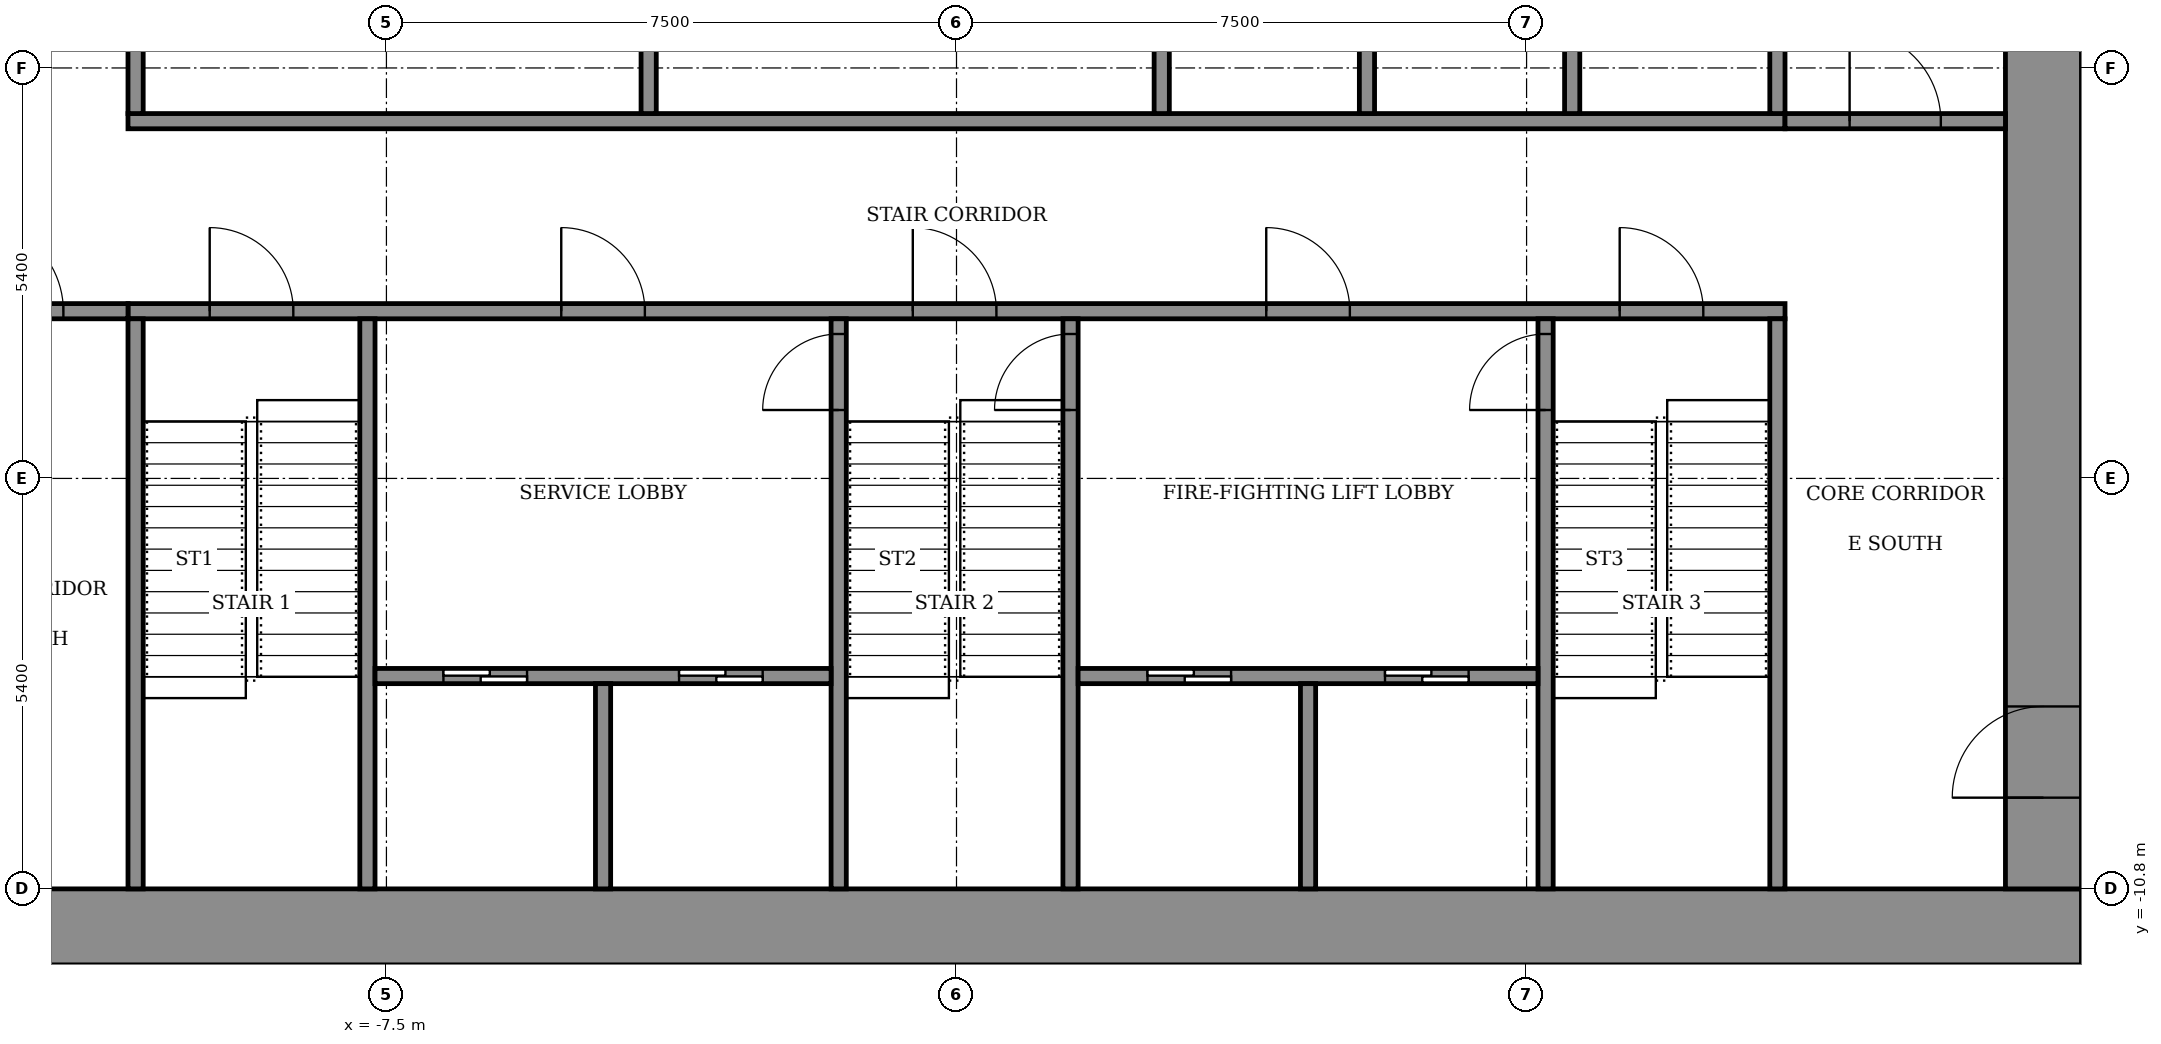
"""IFC4 building model, lengths in metres.
Left out: names, types, materials, properties, quantities, classifications, styles, units other than length and angle.
Written with IfcOpenShell. Run it as: python <this file> out.ifc"""

import sys

from ifc_helpers import new_model, si_unit, direction, frame, frame_2d, origin, place, context, subcontext, project, spatial, rectangle, extrude, element, fill, save


model = new_model("IFC4")
c1 = context("Model", 3, precision=1e-05, world=origin(), true_north=direction((0.0, 1.0)))
c2 = subcontext(c1, "Body", "Model", "MODEL_VIEW")
j1 = project(units=[si_unit("LENGTHUNIT", "METRE"), si_unit("PLANEANGLEUNIT", "RADIAN")], contexts=[c1])
p1 = place(None, origin())
s1 = spatial("IfcSite", under=j1, at=p1, CompositionType="ELEMENT")
p2 = place(p1, origin())
s2 = spatial("IfcBuilding", under=s1, at=p2, CompositionType="ELEMENT")
p3 = place(p2, frame((0.0, 0.0, 125.5)))
s3 = spatial("IfcBuildingStorey", under=s2, at=p3, CompositionType="ELEMENT", Elevation=125.5)
p4 = place(p3, frame((-14.8, -11.3, 0.0), z_axis=(0.0, 0.0, 1.0), x_axis=(1.0, 0.0, 0.0)))
e1 = element("IfcWall", 1, at=p4, inside=s3, PredefinedType="SHEAR", context=c2, shape_type="SweptSolid", body=[
    extrude(rectangle(XDim=29.6, YDim=1.0, at=frame_2d((14.8, 0.0))), origin(), (0.0, 0.0, 1.0), 4.6),
])
p5 = place(p3, frame((14.3, -10.8, 0.0), z_axis=(0.0, 0.0, 1.0), x_axis=(0.0, 1.0, 0.0)))
e2 = element("IfcWall", 2, at=p5, inside=s3, PredefinedType="SHEAR", context=c2, shape_type="SweptSolid", body=[
    extrude(rectangle(XDim=21.6, YDim=1.0, at=frame_2d((10.8, 0.0))), origin(), (0.0, 0.0, 1.0), 4.6),
])
p6 = place(p5, frame((1.2, 0.0, 0.0)))
e3 = element("IfcOpeningElement", 3, at=p6, cuts=e2, PredefinedType="OPENING", context=c2, shape_type="SweptSolid", body=[
    extrude(rectangle(XDim=1.2, YDim=2.1, at=frame_2d((0.6, 1.05))), frame((0.0, 0.51, 0.0), z_axis=(0.0, -1.0, 0.0), x_axis=(1.0, 0.0, 0.0)), (0.0, 0.0, 1.0), 1.02),
])
p7 = place(p3, frame((-10.9, -3.2, 0.0), z_axis=(0.0, 0.0, 1.0), x_axis=(1.0, 0.0, 0.0)))
e4 = element("IfcWall", 4, at=p7, inside=s3, PredefinedType="SHEAR", context=c2, shape_type="SweptSolid", body=[
    extrude(rectangle(XDim=21.8, YDim=0.2, at=frame_2d((10.9, 0.0))), origin(), (0.0, 0.0, 1.0), 4.05),
])
p8 = place(p7, frame((1.075, 0.0, 0.0)))
e5 = element("IfcOpeningElement", 5, at=p8, cuts=e4, PredefinedType="OPENING", context=c2, shape_type="SweptSolid", body=[
    extrude(rectangle(XDim=1.1, YDim=2.1, at=frame_2d((0.55, 1.05))), frame((0.0, 0.11, 0.0), z_axis=(0.0, -1.0, 0.0), x_axis=(1.0, 0.0, 0.0)), (0.0, 0.0, 1.0), 0.22),
])
p9 = place(p7, frame((10.325, 0.0, 0.0)))
e6 = element("IfcOpeningElement", 6, at=p9, cuts=e4, PredefinedType="OPENING", context=c2, shape_type="SweptSolid", body=[
    extrude(rectangle(XDim=1.1, YDim=2.1, at=frame_2d((0.55, 1.05))), frame((0.0, 0.11, 0.0), z_axis=(0.0, -1.0, 0.0), x_axis=(1.0, 0.0, 0.0)), (0.0, 0.0, 1.0), 0.22),
])
p10 = place(p7, frame((19.625, 0.0, 0.0)))
e7 = element("IfcOpeningElement", 7, at=p10, cuts=e4, PredefinedType="OPENING", context=c2, shape_type="SweptSolid", body=[
    extrude(rectangle(XDim=1.1, YDim=2.1, at=frame_2d((0.55, 1.05))), frame((0.0, 0.11, 0.0), z_axis=(0.0, -1.0, 0.0), x_axis=(1.0, 0.0, 0.0)), (0.0, 0.0, 1.0), 0.22),
])
p11 = place(p7, frame((5.7, 0.0, 0.0)))
e8 = element("IfcOpeningElement", 8, at=p11, cuts=e4, PredefinedType="OPENING", context=c2, shape_type="SweptSolid", body=[
    extrude(rectangle(XDim=1.1, YDim=2.1, at=frame_2d((0.55, 1.05))), frame((0.0, 0.11, 0.0), z_axis=(0.0, -1.0, 0.0), x_axis=(1.0, 0.0, 0.0)), (0.0, 0.0, 1.0), 0.22),
])
p12 = place(p7, frame((14.975, 0.0, 0.0)))
e9 = element("IfcOpeningElement", 9, at=p12, cuts=e4, PredefinedType="OPENING", context=c2, shape_type="SweptSolid", body=[
    extrude(rectangle(XDim=1.1, YDim=2.1, at=frame_2d((0.55, 1.05))), frame((0.0, 0.11, 0.0), z_axis=(0.0, -1.0, 0.0), x_axis=(1.0, 0.0, 0.0)), (0.0, 0.0, 1.0), 0.22),
])
p13 = place(p3, frame((-10.9, -0.7, 0.0), z_axis=(0.0, 0.0, 1.0), x_axis=(1.0, 0.0, 0.0)))
e10 = element("IfcWall", 10, at=p13, inside=s3, PredefinedType="SHEAR", context=c2, shape_type="SweptSolid", body=[
    extrude(rectangle(XDim=21.8, YDim=0.2, at=frame_2d((10.9, 0.0))), origin(), (0.0, 0.0, 1.0), 4.05),
])
for number, where, z_axis, x_axis in (
    (11, (-10.8, -10.8, 0.0), (0.0, 0.0, 1.0), (0.0, 1.0, 0.0)),
    (12, (-7.75, -10.8, 0.0), (0.0, 0.0, 1.0), (0.0, 1.0, 0.0)),
):
    element("IfcWall", number, at=place(p3, frame(where, z_axis=z_axis, x_axis=x_axis)), inside=s3, PredefinedType="SHEAR", context=c2, shape_type="SweptSolid", body=[
        extrude(rectangle(XDim=7.5, YDim=0.2, at=frame_2d((3.75, 0.0))), origin(), (0.0, 0.0, 1.0), 4.05),
    ])
p14 = place(p3, frame((-1.55, -10.8, 0.0), z_axis=(0.0, 0.0, 1.0), x_axis=(0.0, 1.0, 0.0)))
e13 = element("IfcWall", 13, at=p14, inside=s3, PredefinedType="SHEAR", context=c2, shape_type="SweptSolid", body=[
    extrude(rectangle(XDim=7.5, YDim=0.2, at=frame_2d((3.75, 0.0))), origin(), (0.0, 0.0, 1.0), 4.05),
])
p15 = place(p14, frame((6.3, 0.0, 0.0)))
e14 = element("IfcOpeningElement", 14, at=p15, cuts=e13, PredefinedType="OPENING", context=c2, shape_type="SweptSolid", body=[
    extrude(rectangle(XDim=1.0, YDim=2.1, at=frame_2d((0.5, 1.05))), frame((0.0, 0.11, 0.0), z_axis=(0.0, -1.0, 0.0), x_axis=(1.0, 0.0, 0.0)), (0.0, 0.0, 1.0), 0.22),
])
p16 = place(p3, frame((1.5, -10.8, 0.0), z_axis=(0.0, 0.0, 1.0), x_axis=(0.0, 1.0, 0.0)))
e15 = element("IfcWall", 15, at=p16, inside=s3, PredefinedType="SHEAR", context=c2, shape_type="SweptSolid", body=[
    extrude(rectangle(XDim=7.5, YDim=0.2, at=frame_2d((3.75, 0.0))), origin(), (0.0, 0.0, 1.0), 4.05),
])
p17 = place(p16, frame((6.3, 0.0, 0.0)))
e16 = element("IfcOpeningElement", 16, at=p17, cuts=e15, PredefinedType="OPENING", context=c2, shape_type="SweptSolid", body=[
    extrude(rectangle(XDim=1.0, YDim=2.1, at=frame_2d((0.5, 1.05))), frame((0.0, 0.11, 0.0), z_axis=(0.0, -1.0, 0.0), x_axis=(1.0, 0.0, 0.0)), (0.0, 0.0, 1.0), 0.22),
])
p18 = place(p3, frame((7.75, -10.8, 0.0), z_axis=(0.0, 0.0, 1.0), x_axis=(0.0, 1.0, 0.0)))
e17 = element("IfcWall", 17, at=p18, inside=s3, PredefinedType="SHEAR", context=c2, shape_type="SweptSolid", body=[
    extrude(rectangle(XDim=7.5, YDim=0.2, at=frame_2d((3.75, 0.0))), origin(), (0.0, 0.0, 1.0), 4.05),
])
p19 = place(p18, frame((6.3, 0.0, 0.0)))
e18 = element("IfcOpeningElement", 18, at=p19, cuts=e17, PredefinedType="OPENING", context=c2, shape_type="SweptSolid", body=[
    extrude(rectangle(XDim=1.0, YDim=2.1, at=frame_2d((0.5, 1.05))), frame((0.0, 0.11, 0.0), z_axis=(0.0, -1.0, 0.0), x_axis=(1.0, 0.0, 0.0)), (0.0, 0.0, 1.0), 0.22),
])
p20 = place(p3, frame((10.8, -10.8, 0.0), z_axis=(0.0, 0.0, 1.0), x_axis=(0.0, 1.0, 0.0)))
e19 = element("IfcWall", 19, at=p20, inside=s3, PredefinedType="SHEAR", context=c2, shape_type="SweptSolid", body=[
    extrude(rectangle(XDim=7.5, YDim=0.2, at=frame_2d((3.75, 0.0))), origin(), (0.0, 0.0, 1.0), 4.05),
])
p21 = place(p3, frame((-7.65, -8.0, 0.0), z_axis=(0.0, 0.0, 1.0), x_axis=(1.0, 0.0, 0.0)))
e20 = element("IfcWall", 20, at=p21, inside=s3, PredefinedType="SHEAR", context=c2, shape_type="SweptSolid", body=[
    extrude(rectangle(XDim=6.0, YDim=0.2, at=frame_2d((3.0, 0.0))), origin(), (0.0, 0.0, 1.0), 4.05),
])
p22 = place(p21, frame((0.9, 0.0, 0.0)))
e21 = element("IfcOpeningElement", 21, at=p22, cuts=e20, PredefinedType="OPENING", context=c2, shape_type="SweptSolid", body=[
    extrude(rectangle(XDim=1.1, YDim=2.1, at=frame_2d((0.55, 1.05))), frame((0.0, 0.11, 0.0), z_axis=(0.0, -1.0, 0.0), x_axis=(1.0, 0.0, 0.0)), (0.0, 0.0, 1.0), 0.22),
])
p23 = place(p21, frame((4.0, 0.0, 0.0)))
e22 = element("IfcOpeningElement", 22, at=p23, cuts=e20, PredefinedType="OPENING", context=c2, shape_type="SweptSolid", body=[
    extrude(rectangle(XDim=1.1, YDim=2.1, at=frame_2d((0.55, 1.05))), frame((0.0, 0.11, 0.0), z_axis=(0.0, -1.0, 0.0), x_axis=(1.0, 0.0, 0.0)), (0.0, 0.0, 1.0), 0.22),
])
p24 = place(p3, frame((-4.65, -10.8, 0.0), z_axis=(0.0, 0.0, 1.0), x_axis=(0.0, 1.0, 0.0)))
e23 = element("IfcWall", 23, at=p24, inside=s3, PredefinedType="SHEAR", context=c2, shape_type="SweptSolid", body=[
    extrude(rectangle(XDim=2.7, YDim=0.2, at=frame_2d((1.35, 0.0))), origin(), (0.0, 0.0, 1.0), 4.05),
])
p25 = place(p3, frame((1.6, -8.0, 0.0), z_axis=(0.0, 0.0, 1.0), x_axis=(1.0, 0.0, 0.0)))
e24 = element("IfcWall", 24, at=p25, inside=s3, PredefinedType="SHEAR", context=c2, shape_type="SweptSolid", body=[
    extrude(rectangle(XDim=6.05, YDim=0.2, at=frame_2d((3.025, 0.0))), origin(), (0.0, 0.0, 1.0), 4.05),
])
p26 = place(p25, frame((0.913, 0.0, 0.0)))
e25 = element("IfcOpeningElement", 25, at=p26, cuts=e24, PredefinedType="OPENING", context=c2, shape_type="SweptSolid", body=[
    extrude(rectangle(XDim=1.1, YDim=2.1, at=frame_2d((0.55, 1.05))), frame((0.0, 0.11, 0.0), z_axis=(0.0, -1.0, 0.0), x_axis=(1.0, 0.0, 0.0)), (0.0, 0.0, 1.0), 0.22),
])
p27 = place(p25, frame((4.038, 0.0, 0.0)))
e26 = element("IfcOpeningElement", 26, at=p27, cuts=e24, PredefinedType="OPENING", context=c2, shape_type="SweptSolid", body=[
    extrude(rectangle(XDim=1.1, YDim=2.1, at=frame_2d((0.55, 1.05))), frame((0.0, 0.11, 0.0), z_axis=(0.0, -1.0, 0.0), x_axis=(1.0, 0.0, 0.0)), (0.0, 0.0, 1.0), 0.22),
])
p28 = place(p3, frame((4.625, -10.8, 0.0), z_axis=(0.0, 0.0, 1.0), x_axis=(0.0, 1.0, 0.0)))
e27 = element("IfcWall", 27, at=p28, inside=s3, PredefinedType="SHEAR", context=c2, shape_type="SweptSolid", body=[
    extrude(rectangle(XDim=2.7, YDim=0.2, at=frame_2d((1.35, 0.0))), origin(), (0.0, 0.0, 1.0), 4.05),
])
for number, where, z_axis, x_axis in (
    (28, (-10.8, -0.6, 0.0), (0.0, 0.0, 1.0), (0.0, 1.0, 0.0)),
    (29, (-4.05, -0.6, 0.0), (0.0, 0.0, 1.0), (0.0, 1.0, 0.0)),
):
    element("IfcWall", number, at=place(p3, frame(where, z_axis=z_axis, x_axis=x_axis)), inside=s3, PredefinedType="STANDARD", context=c2, shape_type="SweptSolid", body=[
        extrude(rectangle(XDim=2.5, YDim=0.2, at=frame_2d((1.25, 0.0))), origin(), (0.0, 0.0, 1.0), 4.05),
    ])
for number, where, z_axis, x_axis in (
    (30, (2.7, -0.6, 0.0), (0.0, 0.0, 1.0), (0.0, 1.0, 0.0)),
    (31, (5.4, -0.6, 0.0), (0.0, 0.0, 1.0), (0.0, 1.0, 0.0)),
    (32, (8.1, -0.6, 0.0), (0.0, 0.0, 1.0), (0.0, 1.0, 0.0)),
    (33, (10.8, -0.6, 0.0), (0.0, 0.0, 1.0), (0.0, 1.0, 0.0)),
):
    element("IfcWall", number, at=place(p3, frame(where, z_axis=z_axis, x_axis=x_axis)), inside=s3, PredefinedType="SHEAR", context=c2, shape_type="SweptSolid", body=[
        extrude(rectangle(XDim=2.5, YDim=0.2, at=frame_2d((1.25, 0.0))), origin(), (0.0, 0.0, 1.0), 4.05),
    ])
p29 = place(p3, frame((-13.8, -3.2, 0.0), z_axis=(0.0, 0.0, 1.0), x_axis=(1.0, 0.0, 0.0)))
e34 = element("IfcWall", 34, at=p29, inside=s3, PredefinedType="STANDARD", context=c2, shape_type="SweptSolid", body=[
    extrude(rectangle(XDim=2.9, YDim=0.2, at=frame_2d((1.45, 0.0))), origin(), (0.0, 0.0, 1.0), 4.05),
])
p30 = place(p29, frame((0.85, 0.0, 0.0)))
e35 = element("IfcOpeningElement", 35, at=p30, cuts=e34, PredefinedType="OPENING", context=c2, shape_type="SweptSolid", body=[
    extrude(rectangle(XDim=1.2, YDim=2.1, at=frame_2d((0.6, 1.05))), frame((0.0, 0.11, 0.0), z_axis=(0.0, -1.0, 0.0), x_axis=(1.0, 0.0, 0.0)), (0.0, 0.0, 1.0), 0.22),
])
p31 = place(p3, frame((10.9, -0.7, 0.0), z_axis=(0.0, 0.0, 1.0), x_axis=(1.0, 0.0, 0.0)))
e36 = element("IfcWall", 36, at=p31, inside=s3, PredefinedType="STANDARD", context=c2, shape_type="SweptSolid", body=[
    extrude(rectangle(XDim=2.9, YDim=0.2, at=frame_2d((1.45, 0.0))), origin(), (0.0, 0.0, 1.0), 4.05),
])
p32 = place(p31, frame((0.85, 0.0, 0.0)))
e37 = element("IfcOpeningElement", 37, at=p32, cuts=e36, PredefinedType="OPENING", context=c2, shape_type="SweptSolid", body=[
    extrude(rectangle(XDim=1.2, YDim=2.1, at=frame_2d((0.6, 1.05))), frame((0.0, 0.11, 0.0), z_axis=(0.0, -1.0, 0.0), x_axis=(1.0, 0.0, 0.0)), (0.0, 0.0, 1.0), 0.22),
])
p33 = place(p6, origin())
e38 = element("IfcDoor", 38, at=p33, inside=s3, OperationType="DOUBLE_DOOR_SINGLE_SWING", PredefinedType="DOOR", context=c2, shape_type="SweptSolid", body=[
    extrude(rectangle(XDim=1.2, YDim=2.1, at=frame_2d((0.6, 1.05))), frame((0.0, 0.025, 0.0), z_axis=(0.0, -1.0, 0.0), x_axis=(1.0, 0.0, 0.0)), (0.0, 0.0, 1.0), 0.05),
])
fill(e3, e38)
p34 = place(p26, origin())
e39 = element("IfcDoor", 39, at=p34, inside=s3, OperationType="SLIDING_TO_LEFT", PredefinedType="DOOR", context=c2, shape_type="SweptSolid", body=[
    extrude(rectangle(XDim=1.1, YDim=2.1, at=frame_2d((0.55, 1.05))), frame((0.0, 0.025, 0.0), z_axis=(0.0, -1.0, 0.0), x_axis=(1.0, 0.0, 0.0)), (0.0, 0.0, 1.0), 0.05),
])
fill(e25, e39)
p35 = place(p22, origin())
e40 = element("IfcDoor", 40, at=p35, inside=s3, OperationType="SLIDING_TO_LEFT", PredefinedType="DOOR", context=c2, shape_type="SweptSolid", body=[
    extrude(rectangle(XDim=1.1, YDim=2.1, at=frame_2d((0.55, 1.05))), frame((0.0, 0.025, 0.0), z_axis=(0.0, -1.0, 0.0), x_axis=(1.0, 0.0, 0.0)), (0.0, 0.0, 1.0), 0.05),
])
fill(e21, e40)
p36 = place(p27, origin())
e41 = element("IfcDoor", 41, at=p36, inside=s3, OperationType="SLIDING_TO_LEFT", PredefinedType="DOOR", context=c2, shape_type="SweptSolid", body=[
    extrude(rectangle(XDim=1.1, YDim=2.1, at=frame_2d((0.55, 1.05))), frame((0.0, 0.025, 0.0), z_axis=(0.0, -1.0, 0.0), x_axis=(1.0, 0.0, 0.0)), (0.0, 0.0, 1.0), 0.05),
])
fill(e26, e41)
p37 = place(p23, origin())
e42 = element("IfcDoor", 42, at=p37, inside=s3, OperationType="SLIDING_TO_LEFT", PredefinedType="DOOR", context=c2, shape_type="SweptSolid", body=[
    extrude(rectangle(XDim=1.1, YDim=2.1, at=frame_2d((0.55, 1.05))), frame((0.0, 0.025, 0.0), z_axis=(0.0, -1.0, 0.0), x_axis=(1.0, 0.0, 0.0)), (0.0, 0.0, 1.0), 0.05),
])
fill(e22, e42)
p38 = place(p8, origin())
e43 = element("IfcDoor", 43, at=p38, inside=s3, OperationType="SINGLE_SWING_RIGHT", PredefinedType="DOOR", context=c2, shape_type="SweptSolid", body=[
    extrude(rectangle(XDim=1.1, YDim=2.1, at=frame_2d((0.55, 1.05))), frame((0.0, 0.025, 0.0), z_axis=(0.0, -1.0, 0.0), x_axis=(1.0, 0.0, 0.0)), (0.0, 0.0, 1.0), 0.05),
])
fill(e5, e43)
p39 = place(p9, origin())
e44 = element("IfcDoor", 44, at=p39, inside=s3, OperationType="SINGLE_SWING_RIGHT", PredefinedType="DOOR", context=c2, shape_type="SweptSolid", body=[
    extrude(rectangle(XDim=1.1, YDim=2.1, at=frame_2d((0.55, 1.05))), frame((0.0, 0.025, 0.0), z_axis=(0.0, -1.0, 0.0), x_axis=(1.0, 0.0, 0.0)), (0.0, 0.0, 1.0), 0.05),
])
fill(e6, e44)
p40 = place(p10, origin())
e45 = element("IfcDoor", 45, at=p40, inside=s3, OperationType="SINGLE_SWING_RIGHT", PredefinedType="DOOR", context=c2, shape_type="SweptSolid", body=[
    extrude(rectangle(XDim=1.1, YDim=2.1, at=frame_2d((0.55, 1.05))), frame((0.0, 0.025, 0.0), z_axis=(0.0, -1.0, 0.0), x_axis=(1.0, 0.0, 0.0)), (0.0, 0.0, 1.0), 0.05),
])
fill(e7, e45)
p41 = place(p11, origin())
e46 = element("IfcDoor", 46, at=p41, inside=s3, OperationType="SINGLE_SWING_LEFT", PredefinedType="DOOR", context=c2, shape_type="SweptSolid", body=[
    extrude(rectangle(XDim=1.1, YDim=2.1, at=frame_2d((0.55, 1.05))), frame((0.0, 0.025, 0.0), z_axis=(0.0, -1.0, 0.0), x_axis=(1.0, 0.0, 0.0)), (0.0, 0.0, 1.0), 0.05),
])
fill(e8, e46)
p42 = place(p12, origin())
e47 = element("IfcDoor", 47, at=p42, inside=s3, OperationType="SINGLE_SWING_LEFT", PredefinedType="DOOR", context=c2, shape_type="SweptSolid", body=[
    extrude(rectangle(XDim=1.1, YDim=2.1, at=frame_2d((0.55, 1.05))), frame((0.0, 0.025, 0.0), z_axis=(0.0, -1.0, 0.0), x_axis=(1.0, 0.0, 0.0)), (0.0, 0.0, 1.0), 0.05),
])
fill(e9, e47)
p43 = place(p15, origin())
e48 = element("IfcDoor", 48, at=p43, inside=s3, OperationType="SINGLE_SWING_RIGHT", PredefinedType="DOOR", context=c2, shape_type="SweptSolid", body=[
    extrude(rectangle(XDim=1.0, YDim=2.1, at=frame_2d((0.5, 1.05))), frame((0.0, 0.025, 0.0), z_axis=(0.0, -1.0, 0.0), x_axis=(1.0, 0.0, 0.0)), (0.0, 0.0, 1.0), 0.05),
])
fill(e14, e48)
p44 = place(p17, origin())
e49 = element("IfcDoor", 49, at=p44, inside=s3, OperationType="SINGLE_SWING_RIGHT", PredefinedType="DOOR", context=c2, shape_type="SweptSolid", body=[
    extrude(rectangle(XDim=1.0, YDim=2.1, at=frame_2d((0.5, 1.05))), frame((0.0, 0.025, 0.0), z_axis=(0.0, -1.0, 0.0), x_axis=(1.0, 0.0, 0.0)), (0.0, 0.0, 1.0), 0.05),
])
fill(e16, e49)
p45 = place(p19, origin())
e50 = element("IfcDoor", 50, at=p45, inside=s3, OperationType="SINGLE_SWING_RIGHT", PredefinedType="DOOR", context=c2, shape_type="SweptSolid", body=[
    extrude(rectangle(XDim=1.0, YDim=2.1, at=frame_2d((0.5, 1.05))), frame((0.0, 0.025, 0.0), z_axis=(0.0, -1.0, 0.0), x_axis=(1.0, 0.0, 0.0)), (0.0, 0.0, 1.0), 0.05),
])
fill(e18, e50)
p46 = place(p30, origin())
e51 = element("IfcDoor", 51, at=p46, inside=s3, OperationType="SINGLE_SWING_LEFT", PredefinedType="DOOR", context=c2, shape_type="SweptSolid", body=[
    extrude(rectangle(XDim=1.2, YDim=2.1, at=frame_2d((0.6, 1.05))), frame((0.0, 0.025, 0.0), z_axis=(0.0, -1.0, 0.0), x_axis=(1.0, 0.0, 0.0)), (0.0, 0.0, 1.0), 0.05),
])
fill(e35, e51)
p47 = place(p32, origin())
e52 = element("IfcDoor", 52, at=p47, inside=s3, OperationType="SINGLE_SWING_LEFT", PredefinedType="DOOR", context=c2, shape_type="SweptSolid", body=[
    extrude(rectangle(XDim=1.2, YDim=2.1, at=frame_2d((0.6, 1.05))), frame((0.0, 0.025, 0.0), z_axis=(0.0, -1.0, 0.0), x_axis=(1.0, 0.0, 0.0)), (0.0, 0.0, 1.0), 0.05),
])
fill(e37, e52)
save(model, sys.argv[1])
